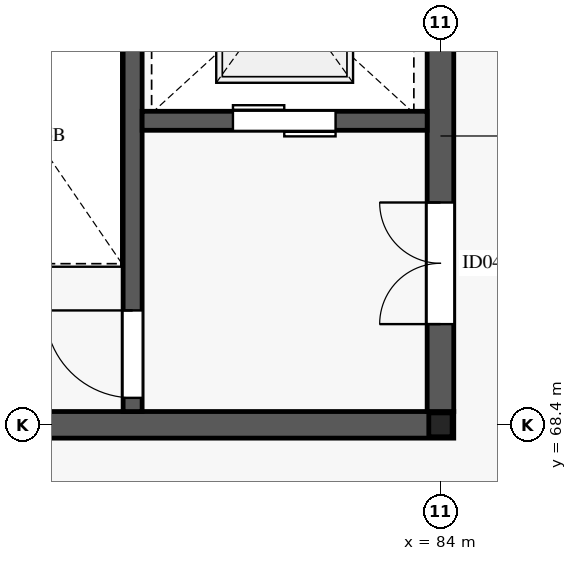
"""IFC4 building model, lengths in metres.
Left out: names, types, materials, properties, quantities, classifications, styles, units other than length and angle.
Written with IfcOpenShell. Run it as: python <this file> out.ifc"""

import sys

from ifc_helpers import new_model, si_unit, direction, frame, frame_2d, origin, origin_2d, place, context, subcontext, project, spatial, rectangle, i_section, extrude, element, fill, save


model = new_model("IFC4")
c1 = context("Model", 3, precision=1e-05, world=origin(), true_north=direction((0.0, 1.0)))
c2 = subcontext(c1, "Body", "Model", "MODEL_VIEW")
j1 = project(units=[si_unit("LENGTHUNIT", "METRE"), si_unit("PLANEANGLEUNIT", "RADIAN")], contexts=[c1])
p1 = place(None, origin())
s1 = spatial("IfcSite", under=j1, at=p1, CompositionType="ELEMENT")
p2 = place(p1, origin())
s2 = spatial("IfcBuilding", under=s1, at=p2, CompositionType="ELEMENT")
p3 = place(p2, frame((0.0, 0.0, 33.6)))
s3 = spatial("IfcBuildingStorey", under=s2, at=p3, CompositionType="ELEMENT", Elevation=33.6)
p4 = place(p3, frame((84.0, 68.4, 0.0), z_axis=(0.0, 0.0, 1.0), x_axis=(1.0, 0.0, 0.0)))
e1 = element("IfcColumn", 1, at=p4, inside=s3, PredefinedType="COLUMN", context=c2, shape_type="SweptSolid", body=[
    extrude(i_section(OverallWidth=0.307, OverallDepth=0.314, WebThickness=0.012, FlangeThickness=0.019, FilletRadius=0.015, at=origin_2d()), origin(), (0.0, 0.0, 1.0), 3.995),
])
p5 = place(p3, frame((75.825, 68.4, 0.0), z_axis=(0.0, 0.0, 1.0), x_axis=(1.0, 0.0, 0.0)))
e2 = element("IfcWall", 2, at=p5, inside=s3, PredefinedType="SHEAR", context=c2, shape_type="SweptSolid", body=[
    extrude(rectangle(XDim=8.35, YDim=0.35, at=frame_2d((4.175, 0.0))), origin(), (0.0, 0.0, 1.0), 3.99),
])
p6 = place(p3, frame((84.0, 68.575, 0.0), z_axis=(0.0, 0.0, 1.0), x_axis=(0.0, 1.0, 0.0)))
e3 = element("IfcWall", 3, at=p6, inside=s3, PredefinedType="SHEAR", context=c2, shape_type="SweptSolid", body=[
    extrude(rectangle(XDim=7.25, YDim=0.35, at=frame_2d((3.625, 0.0))), origin(), (0.0, 0.0, 1.0), 3.99),
])
p7 = place(p6, frame((1.15, 0.0, 0.0)))
e4 = element("IfcOpeningElement", 4, at=p7, cuts=e3, PredefinedType="OPENING", context=c2, shape_type="SweptSolid", body=[
    extrude(rectangle(XDim=1.6, YDim=2.35, at=frame_2d((0.8, 1.175))), frame((0.0, 0.185, 0.0), z_axis=(0.0, -1.0, 0.0), x_axis=(1.0, 0.0, 0.0)), (0.0, 0.0, 1.0), 0.37),
])
p8 = place(p3, frame((79.95, 68.575, 0.0), z_axis=(0.0, 0.0, 1.0), x_axis=(0.0, 1.0, 0.0)))
e5 = element("IfcWall", 5, at=p8, inside=s3, PredefinedType="SHEAR", context=c2, shape_type="SweptSolid", body=[
    extrude(rectangle(XDim=7.25, YDim=0.25, at=frame_2d((3.625, 0.0))), origin(), (0.0, 0.0, 1.0), 3.99),
])
p9 = place(p8, frame((0.18, 0.0, 0.0)))
e6 = element("IfcOpeningElement", 6, at=p9, cuts=e5, PredefinedType="OPENING", context=c2, shape_type="SweptSolid", body=[
    extrude(rectangle(XDim=1.15, YDim=2.2, at=frame_2d((0.575, 1.1))), frame((0.0, 0.135, 0.0), z_axis=(0.0, -1.0, 0.0), x_axis=(1.0, 0.0, 0.0)), (0.0, 0.0, 1.0), 0.27),
])
p10 = place(p3, frame((80.075, 72.4, 0.0), z_axis=(0.0, 0.0, 1.0), x_axis=(1.0, 0.0, 0.0)))
e7 = element("IfcWall", 7, at=p10, inside=s3, PredefinedType="SHEAR", context=c2, shape_type="SweptSolid", body=[
    extrude(rectangle(XDim=3.75, YDim=0.25, at=frame_2d((1.875, 0.0))), origin(), (0.0, 0.0, 1.0), 3.99),
])
p11 = place(p10, frame((1.195, 0.0, 0.0)))
e8 = element("IfcOpeningElement", 8, at=p11, cuts=e7, PredefinedType="OPENING", context=c2, shape_type="SweptSolid", body=[
    extrude(rectangle(XDim=1.35, YDim=2.2, at=frame_2d((0.675, 1.1))), frame((0.0, 0.135, 0.0), z_axis=(0.0, -1.0, 0.0), x_axis=(1.0, 0.0, 0.0)), (0.0, 0.0, 1.0), 0.27),
])
p12 = place(p9, origin())
e9 = element("IfcDoor", 9, at=p12, inside=s3, OperationType="SINGLE_SWING_RIGHT", PredefinedType="DOOR", context=c2, shape_type="SweptSolid", body=[
    extrude(rectangle(XDim=1.15, YDim=2.2, at=frame_2d((0.575, 1.1))), frame((0.0, 0.025, 0.0), z_axis=(0.0, -1.0, 0.0), x_axis=(1.0, 0.0, 0.0)), (0.0, 0.0, 1.0), 0.05),
])
fill(e6, e9)
p13 = place(p7, origin())
e10 = element("IfcDoor", 10, at=p13, inside=s3, OperationType="DOUBLE_DOOR_SINGLE_SWING", PredefinedType="DOOR", context=c2, shape_type="SweptSolid", body=[
    extrude(rectangle(XDim=1.6, YDim=2.35, at=frame_2d((0.8, 1.175))), frame((0.0, 0.025, 0.0), z_axis=(0.0, -1.0, 0.0), x_axis=(1.0, 0.0, 0.0)), (0.0, 0.0, 1.0), 0.05),
])
fill(e4, e10)
p14 = place(p11, origin())
e11 = element("IfcDoor", 11, at=p14, inside=s3, OperationType="DOUBLE_DOOR_SLIDING", PredefinedType="DOOR", context=c2, shape_type="SweptSolid", body=[
    extrude(rectangle(XDim=1.35, YDim=2.2, at=frame_2d((0.675, 1.1))), frame((0.0, 0.025, 0.0), z_axis=(0.0, -1.0, 0.0), x_axis=(1.0, 0.0, 0.0)), (0.0, 0.0, 1.0), 0.05),
])
fill(e8, e11)
save(model, sys.argv[1])
